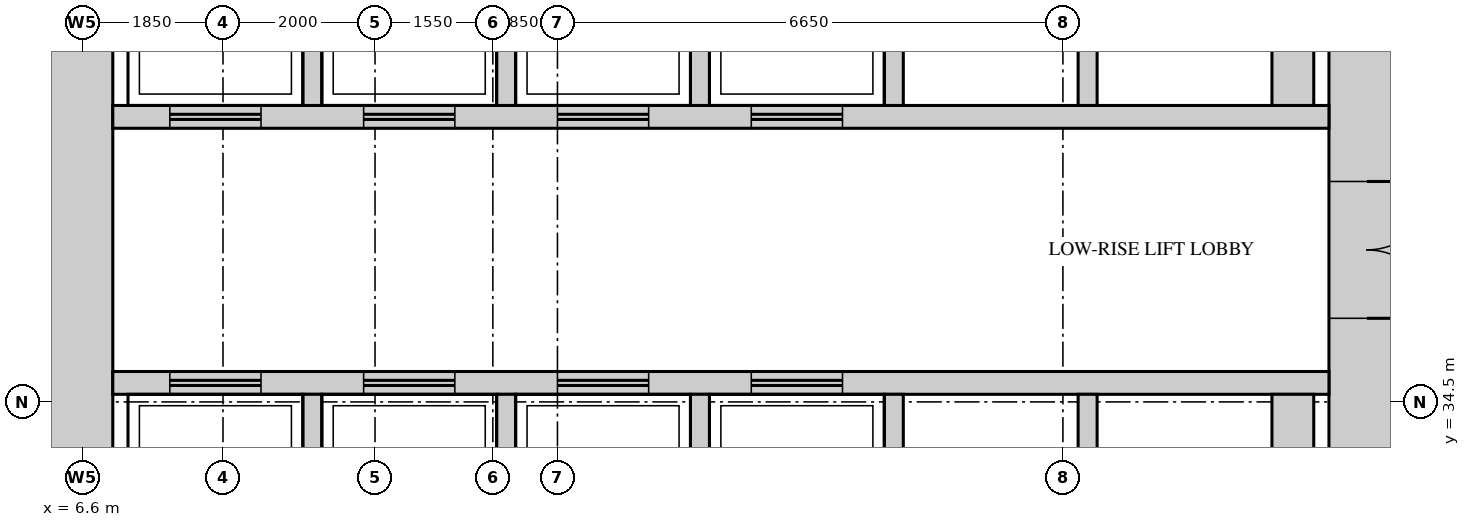
"""IFC4 building model, lengths in metres.
Left out: names, types, materials, properties, quantities, classifications, styles, units other than length and angle.
Written with IfcOpenShell. Run it as: python <this file> out.ifc"""

import sys

from ifc_helpers import new_model, si_unit, direction, frame, frame_2d, origin, place, context, subcontext, project, spatial, rectangle, extrude, source, transform, mapped, element, fill, save


model = new_model("IFC4")
c1 = context("Model", 3, precision=1e-05, world=origin(), true_north=direction((0.0, 1.0)))
c2 = subcontext(c1, "Body", "Model", "MODEL_VIEW")
j1 = project(units=[si_unit("LENGTHUNIT", "METRE"), si_unit("PLANEANGLEUNIT", "RADIAN")], contexts=[c1])
p1 = place(None, origin())
s1 = spatial("IfcSite", under=j1, at=p1, CompositionType="ELEMENT")
p2 = place(p1, origin())
s2 = spatial("IfcBuilding", under=s1, at=p2, CompositionType="ELEMENT")
p3 = place(p2, frame((0.0, 0.0, 123.5)))
s3 = spatial("IfcBuildingStorey", under=s2, at=p3, CompositionType="ELEMENT", Elevation=123.5)
m1 = source(origin(), c2, "Body", "SweptSolid", [
    extrude(rectangle(XDim=28.0, YDim=1.0, at=frame_2d((14.0, 0.0))), origin(), (0.0, 0.0, 1.0), 4.1),
])
p4 = place(p3, frame((23.5, 13.0, 0.0), z_axis=(0.0, 0.0, 1.0), x_axis=(0.0, 1.0, 0.0)))
e1 = element("IfcWall", 1, at=p4, inside=s3, PredefinedType="SHEAR", context=c2, shape_type="MappedRepresentation", body=[
    mapped(m1, transform((0.0, 0.0, 0.0))),
])
m2 = source(origin(), c2, "Body", "SweptSolid", [
    extrude(rectangle(XDim=1.8, YDim=2.1, at=frame_2d((0.9, 1.05))), frame((0.0, 0.51, 0.0), z_axis=(0.0, -1.0, 0.0), x_axis=(1.0, 0.0, 0.0)), (0.0, 0.0, 1.0), 1.02),
])
p5 = place(p4, frame((22.6, 0.0, 0.0)))
e2 = element("IfcOpeningElement", 2, at=p5, cuts=e1, PredefinedType="OPENING", context=c2, shape_type="MappedRepresentation", body=[
    mapped(m2, transform((0.0, 0.0, 0.0))),
])
m3 = source(origin(), c2, "Body", "SweptSolid", [
    extrude(rectangle(XDim=1.2, YDim=2.1, at=frame_2d((0.6, 1.05))), frame((0.0, 0.51, 0.0), z_axis=(0.0, -1.0, 0.0), x_axis=(1.0, 0.0, 0.0)), (0.0, 0.0, 1.0), 1.02),
])
p6 = place(p4, frame((13.85, 0.0, 0.0)))
e3 = element("IfcOpeningElement", 3, at=p6, cuts=e1, PredefinedType="OPENING", context=c2, shape_type="MappedRepresentation", body=[
    mapped(m3, transform((0.0, 0.0, 0.0))),
])
m4 = source(origin(), c2, "Body", "SweptSolid", [
    extrude(rectangle(XDim=0.9, YDim=2.1, at=frame_2d((0.45, 1.05))), frame((0.0, 0.51, 0.0), z_axis=(0.0, -1.0, 0.0), x_axis=(1.0, 0.0, 0.0)), (0.0, 0.0, 1.0), 1.02),
])
p7 = place(p4, frame((2.15, 0.0, 0.0)))
e4 = element("IfcOpeningElement", 4, at=p7, cuts=e1, PredefinedType="OPENING", context=c2, shape_type="MappedRepresentation", body=[
    mapped(m4, transform((0.0, 0.0, 0.0))),
])
p8 = place(p4, frame((7.0, 0.0, 0.0)))
e5 = element("IfcOpeningElement", 5, at=p8, cuts=e1, PredefinedType="OPENING", context=c2, shape_type="MappedRepresentation", body=[
    mapped(m4, transform((0.0, 0.0, 0.0))),
])
p9 = place(p3, frame((6.5, 13.0, 0.0), z_axis=(0.0, 0.0, 1.0), x_axis=(0.0, 1.0, 0.0)))
e6 = element("IfcWall", 6, at=p9, inside=s3, PredefinedType="SHEAR", context=c2, shape_type="MappedRepresentation", body=[
    mapped(m1, transform((0.0, 0.0, 0.0))),
])
m5 = source(origin(), c2, "Body", "SweptSolid", [
    extrude(rectangle(XDim=16.0, YDim=0.3, at=frame_2d((8.0, 0.0))), origin(), (0.0, 0.0, 1.0), 4.1),
])
p10 = place(p3, frame((7.0, 38.25, 0.0), z_axis=(0.0, 0.0, 1.0), x_axis=(1.0, 0.0, 0.0)))
e7 = element("IfcWall", 7, at=p10, inside=s3, PredefinedType="STANDARD", context=c2, shape_type="MappedRepresentation", body=[
    mapped(m5, transform((0.0, 0.0, 0.0))),
])
m6 = source(origin(), c2, "Body", "SweptSolid", [
    extrude(rectangle(XDim=1.2, YDim=2.1, at=frame_2d((0.6, 1.05))), frame((0.0, 0.16, 0.0), z_axis=(0.0, -1.0, 0.0), x_axis=(1.0, 0.0, 0.0)), (0.0, 0.0, 1.0), 0.32),
])
p11 = place(p10, frame((0.75, 0.0, 0.0)))
e8 = element("IfcOpeningElement", 8, at=p11, cuts=e7, PredefinedType="OPENING", context=c2, shape_type="MappedRepresentation", body=[
    mapped(m6, transform((0.0, 0.0, 0.0))),
])
p12 = place(p10, frame((3.3, 0.0, 0.0)))
e9 = element("IfcOpeningElement", 9, at=p12, cuts=e7, PredefinedType="OPENING", context=c2, shape_type="MappedRepresentation", body=[
    mapped(m6, transform((0.0, 0.0, 0.0))),
])
p13 = place(p10, frame((5.85, 0.0, 0.0)))
e10 = element("IfcOpeningElement", 10, at=p13, cuts=e7, PredefinedType="OPENING", context=c2, shape_type="MappedRepresentation", body=[
    mapped(m6, transform((0.0, 0.0, 0.0))),
])
p14 = place(p10, frame((8.4, 0.0, 0.0)))
e11 = element("IfcOpeningElement", 11, at=p14, cuts=e7, PredefinedType="OPENING", context=c2, shape_type="MappedRepresentation", body=[
    mapped(m6, transform((0.0, 0.0, 0.0))),
])
p15 = place(p3, frame((7.0, 34.75, 0.0), z_axis=(0.0, 0.0, 1.0), x_axis=(1.0, 0.0, 0.0)))
e12 = element("IfcWall", 12, at=p15, inside=s3, PredefinedType="STANDARD", context=c2, shape_type="MappedRepresentation", body=[
    mapped(m5, transform((0.0, 0.0, 0.0))),
])
p16 = place(p15, frame((0.75, 0.0, 0.0)))
e13 = element("IfcOpeningElement", 13, at=p16, cuts=e12, PredefinedType="OPENING", context=c2, shape_type="MappedRepresentation", body=[
    mapped(m6, transform((0.0, 0.0, 0.0))),
])
p17 = place(p15, frame((3.3, 0.0, 0.0)))
e14 = element("IfcOpeningElement", 14, at=p17, cuts=e12, PredefinedType="OPENING", context=c2, shape_type="MappedRepresentation", body=[
    mapped(m6, transform((0.0, 0.0, 0.0))),
])
p18 = place(p15, frame((5.85, 0.0, 0.0)))
e15 = element("IfcOpeningElement", 15, at=p18, cuts=e12, PredefinedType="OPENING", context=c2, shape_type="MappedRepresentation", body=[
    mapped(m6, transform((0.0, 0.0, 0.0))),
])
p19 = place(p15, frame((8.4, 0.0, 0.0)))
e16 = element("IfcOpeningElement", 16, at=p19, cuts=e12, PredefinedType="OPENING", context=c2, shape_type="MappedRepresentation", body=[
    mapped(m6, transform((0.0, 0.0, 0.0))),
])
m7 = source(origin(), c2, "Body", "SweptSolid", [
    extrude(rectangle(XDim=2.6, YDim=0.25, at=frame_2d((1.3, 0.0))), origin(), (0.0, 0.0, 1.0), 4.1),
])
for number, where, z_axis, x_axis in (
    (17, (9.625, 38.4, 0.0), (0.0, 0.0, 1.0), (0.0, 1.0, 0.0)),
    (18, (12.175, 38.4, 0.0), (0.0, 0.0, 1.0), (0.0, 1.0, 0.0)),
    (19, (14.725, 38.4, 0.0), (0.0, 0.0, 1.0), (0.0, 1.0, 0.0)),
    (20, (17.275, 38.4, 0.0), (0.0, 0.0, 1.0), (0.0, 1.0, 0.0)),
    (21, (19.825, 38.4, 0.0), (0.0, 0.0, 1.0), (0.0, 1.0, 0.0)),
):
    element("IfcWall", number, at=place(p3, frame(where, z_axis=z_axis, x_axis=x_axis)), inside=s3, PredefinedType="STANDARD", context=c2, shape_type="MappedRepresentation", body=[
        mapped(m7, transform((0.0, 0.0, 0.0))),
    ])
m8 = source(origin(), c2, "Body", "SweptSolid", [
    extrude(rectangle(XDim=2.6, YDim=0.55, at=frame_2d((1.3, 0.0))), origin(), (0.0, 0.0, 1.0), 4.1),
])
p20 = place(p3, frame((22.525, 38.4, 0.0), z_axis=(0.0, 0.0, 1.0), x_axis=(0.0, 1.0, 0.0)))
e22 = element("IfcWall", 22, at=p20, inside=s3, PredefinedType="STANDARD", context=c2, shape_type="MappedRepresentation", body=[
    mapped(m8, transform((0.0, 0.0, 0.0))),
])
m9 = source(origin(), c2, "Body", "SweptSolid", [
    extrude(rectangle(XDim=2.4, YDim=0.25, at=frame_2d((1.2, 0.0))), origin(), (0.0, 0.0, 1.0), 4.1),
])
for number, where, z_axis, x_axis in (
    (23, (9.625, 32.2, 0.0), (0.0, 0.0, 1.0), (0.0, 1.0, 0.0)),
    (24, (12.175, 32.2, 0.0), (0.0, 0.0, 1.0), (0.0, 1.0, 0.0)),
    (25, (14.725, 32.2, 0.0), (0.0, 0.0, 1.0), (0.0, 1.0, 0.0)),
    (26, (17.275, 32.2, 0.0), (0.0, 0.0, 1.0), (0.0, 1.0, 0.0)),
    (27, (19.825, 32.2, 0.0), (0.0, 0.0, 1.0), (0.0, 1.0, 0.0)),
):
    element("IfcWall", number, at=place(p3, frame(where, z_axis=z_axis, x_axis=x_axis)), inside=s3, PredefinedType="STANDARD", context=c2, shape_type="MappedRepresentation", body=[
        mapped(m9, transform((0.0, 0.0, 0.0))),
    ])
m10 = source(origin(), c2, "Body", "SweptSolid", [
    extrude(rectangle(XDim=2.4, YDim=0.55, at=frame_2d((1.2, 0.0))), origin(), (0.0, 0.0, 1.0), 4.1),
])
p21 = place(p3, frame((22.525, 32.2, 0.0), z_axis=(0.0, 0.0, 1.0), x_axis=(0.0, 1.0, 0.0)))
e28 = element("IfcWall", 28, at=p21, inside=s3, PredefinedType="STANDARD", context=c2, shape_type="MappedRepresentation", body=[
    mapped(m10, transform((0.0, 0.0, 0.0))),
])
m11 = source(origin(), c2, "Body", "SweptSolid", [
    extrude(rectangle(XDim=1.8, YDim=2.1, at=frame_2d((0.9, 1.05))), frame((0.0, 0.45, 0.0), z_axis=(0.0, -1.0, 0.0), x_axis=(1.0, 0.0, 0.0)), (0.0, 0.0, 1.0), 0.9),
])
p22 = place(p5, origin())
e29 = element("IfcDoor", 29, at=p22, inside=s3, OperationType="DOUBLE_DOOR_SINGLE_SWING", PredefinedType="DOOR", context=c2, shape_type="MappedRepresentation", body=[
    mapped(m11, transform((0.0, 0.0, 0.0))),
])
fill(e2, e29)
m12 = source(origin(), c2, "Body", "SweptSolid", [
    extrude(rectangle(XDim=1.2, YDim=2.1, at=frame_2d((0.6, 1.05))), frame((0.0, 0.025, 0.0), z_axis=(0.0, -1.0, 0.0), x_axis=(1.0, 0.0, 0.0)), (0.0, 0.0, 1.0), 0.05),
])
p23 = place(p16, origin())
e30 = element("IfcDoor", 30, at=p23, inside=s3, OperationType="DOUBLE_DOOR_SLIDING", PredefinedType="DOOR", context=c2, shape_type="MappedRepresentation", body=[
    mapped(m12, transform((0.0, 0.0, 0.0))),
])
fill(e13, e30)
p24 = place(p17, origin())
e31 = element("IfcDoor", 31, at=p24, inside=s3, OperationType="DOUBLE_DOOR_SLIDING", PredefinedType="DOOR", context=c2, shape_type="MappedRepresentation", body=[
    mapped(m12, transform((0.0, 0.0, 0.0))),
])
fill(e14, e31)
p25 = place(p18, origin())
e32 = element("IfcDoor", 32, at=p25, inside=s3, OperationType="DOUBLE_DOOR_SLIDING", PredefinedType="DOOR", context=c2, shape_type="MappedRepresentation", body=[
    mapped(m12, transform((0.0, 0.0, 0.0))),
])
fill(e15, e32)
p26 = place(p19, origin())
e33 = element("IfcDoor", 33, at=p26, inside=s3, OperationType="DOUBLE_DOOR_SLIDING", PredefinedType="DOOR", context=c2, shape_type="MappedRepresentation", body=[
    mapped(m12, transform((0.0, 0.0, 0.0))),
])
fill(e16, e33)
p27 = place(p11, origin())
e34 = element("IfcDoor", 34, at=p27, inside=s3, OperationType="DOUBLE_DOOR_SLIDING", PredefinedType="DOOR", context=c2, shape_type="MappedRepresentation", body=[
    mapped(m12, transform((0.0, 0.0, 0.0))),
])
fill(e8, e34)
p28 = place(p12, origin())
e35 = element("IfcDoor", 35, at=p28, inside=s3, OperationType="DOUBLE_DOOR_SLIDING", PredefinedType="DOOR", context=c2, shape_type="MappedRepresentation", body=[
    mapped(m12, transform((0.0, 0.0, 0.0))),
])
fill(e9, e35)
p29 = place(p13, origin())
e36 = element("IfcDoor", 36, at=p29, inside=s3, OperationType="DOUBLE_DOOR_SLIDING", PredefinedType="DOOR", context=c2, shape_type="MappedRepresentation", body=[
    mapped(m12, transform((0.0, 0.0, 0.0))),
])
fill(e10, e36)
p30 = place(p14, origin())
e37 = element("IfcDoor", 37, at=p30, inside=s3, OperationType="DOUBLE_DOOR_SLIDING", PredefinedType="DOOR", context=c2, shape_type="MappedRepresentation", body=[
    mapped(m12, transform((0.0, 0.0, 0.0))),
])
fill(e11, e37)
save(model, sys.argv[1])
